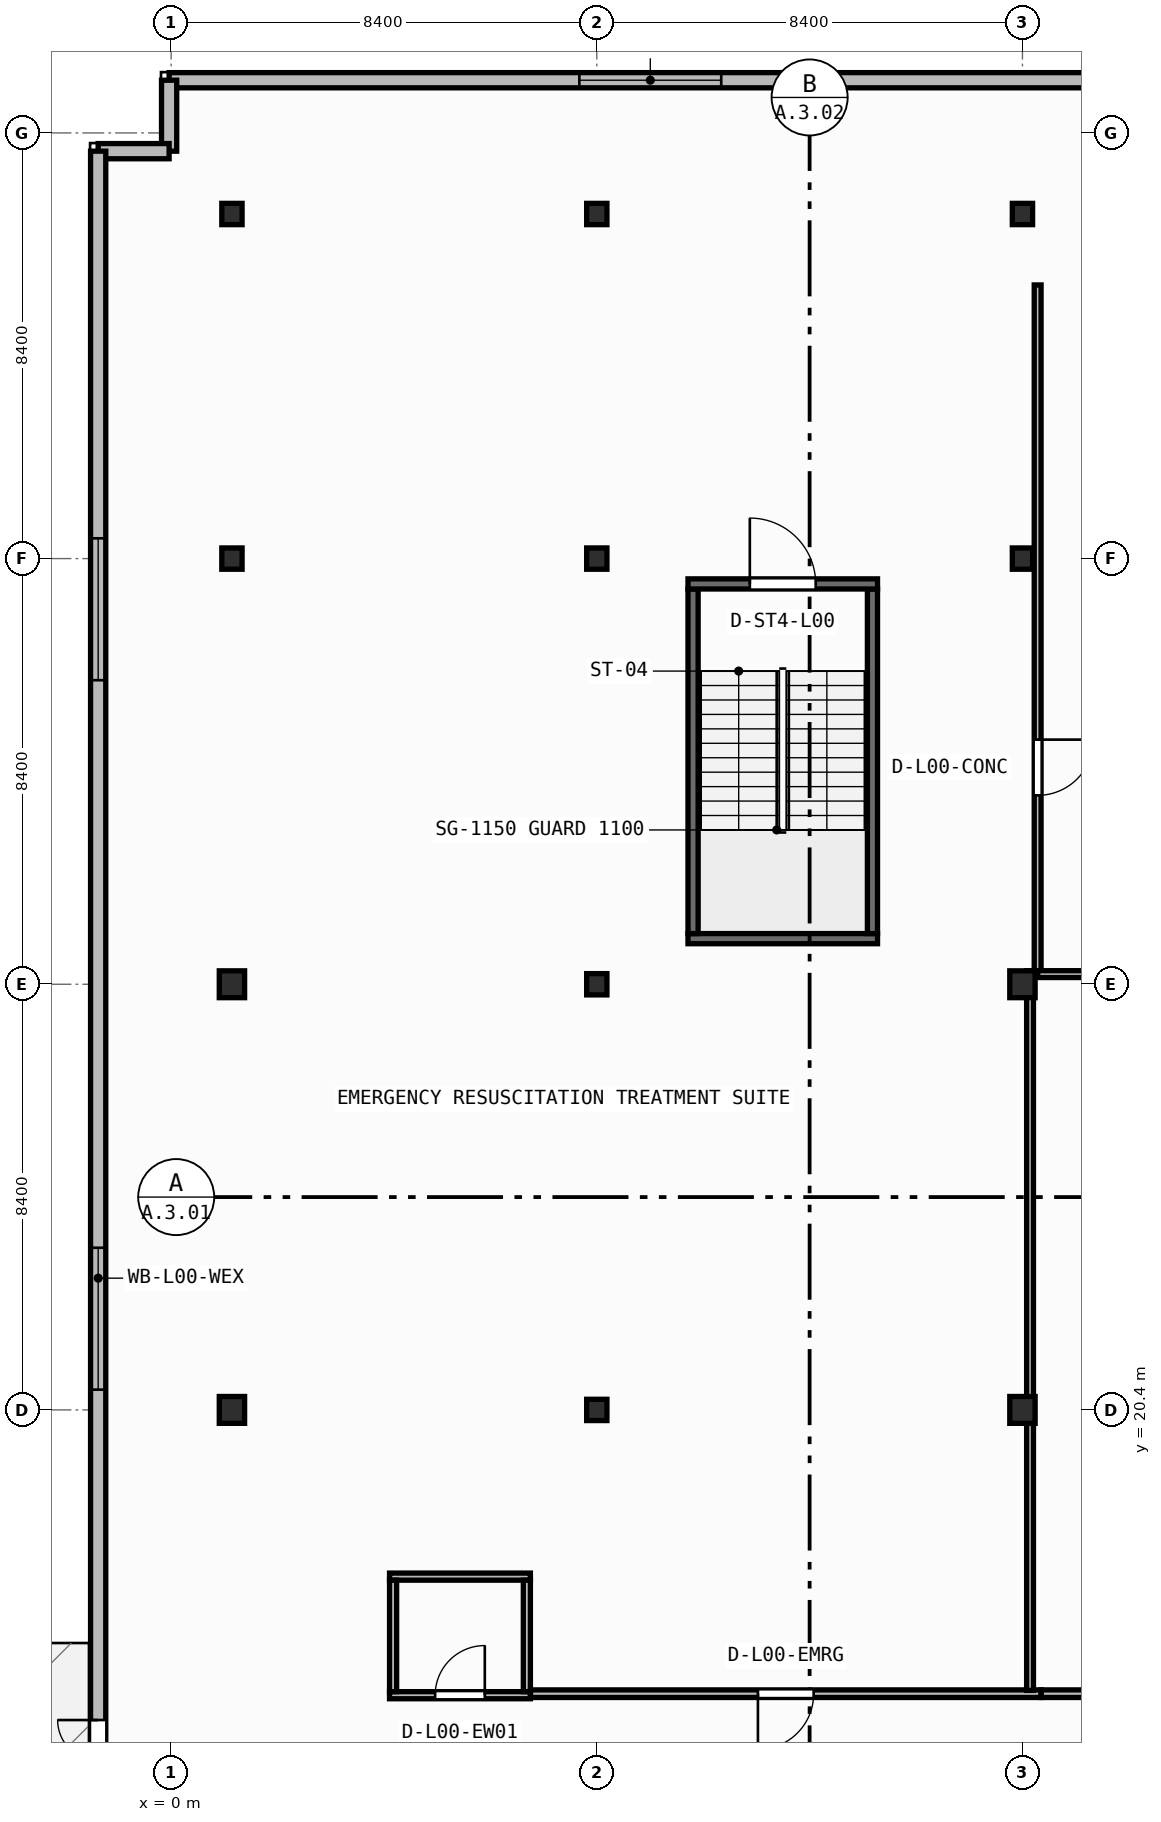
"""IFC4 building model, lengths in metres.
Left out: names, types, materials, properties, quantities, classifications, styles, units other than length and angle.
Written with IfcOpenShell. Run it as: python <this file> out.ifc"""

import sys

from ifc_helpers import new_model, si_unit, direction, frame, frame_2d, origin, origin_2d, place, context, subcontext, project, spatial, rectangle, i_section, extrude, element, fill, save


model = new_model("IFC4")
c1 = context("Model", 3, precision=1e-05, world=origin(), true_north=direction((0.0, 1.0)))
c2 = subcontext(c1, "Body", "Model", "MODEL_VIEW")
j1 = project(units=[si_unit("LENGTHUNIT", "METRE"), si_unit("PLANEANGLEUNIT", "RADIAN")], contexts=[c1])
p1 = place(None, origin())
s1 = spatial("IfcSite", under=j1, at=p1, CompositionType="ELEMENT")
p2 = place(p1, origin())
s2 = spatial("IfcBuilding", under=s1, at=p2, CompositionType="ELEMENT")
p3 = place(p2, origin())
s3 = spatial("IfcBuildingStorey", under=s2, at=p3, CompositionType="ELEMENT", Elevation=0.0)
p4 = place(p3, frame((1.2, 20.4, 0.0), z_axis=(0.0, 0.0, 1.0), x_axis=(1.0, 0.0, 0.0)))
e1 = element("IfcColumn", 1, at=p4, inside=s3, PredefinedType="COLUMN", context=c2, shape_type="SweptSolid", body=[
    extrude(i_section(OverallWidth=0.5, OverallDepth=0.53, WebThickness=0.028, FlangeThickness=0.045, at=origin_2d()), origin(), (0.0, 0.0, 1.0), 4.5),
])
p5 = place(p3, frame((8.4, 20.4, 0.0), z_axis=(0.0, 0.0, 1.0), x_axis=(1.0, 0.0, 0.0)))
e2 = element("IfcColumn", 2, at=p5, inside=s3, PredefinedType="COLUMN", context=c2, shape_type="SweptSolid", body=[
    extrude(i_section(OverallWidth=0.4, OverallDepth=0.42, WebThickness=0.025, FlangeThickness=0.04, at=origin_2d()), origin(), (0.0, 0.0, 1.0), 4.5),
])
for number, where, z_axis, x_axis in (
    (3, (16.8, 20.4, 0.0), (0.0, 0.0, 1.0), (1.0, 0.0, 0.0)),
    (4, (1.2, 28.8, 0.0), (0.0, 0.0, 1.0), (1.0, 0.0, 0.0)),
):
    element("IfcColumn", number, at=place(p3, frame(where, z_axis=z_axis, x_axis=x_axis)), inside=s3, PredefinedType="COLUMN", context=c2, shape_type="SweptSolid", body=[
        extrude(i_section(OverallWidth=0.5, OverallDepth=0.53, WebThickness=0.028, FlangeThickness=0.045, at=origin_2d()), origin(), (0.0, 0.0, 1.0), 4.5),
    ])
p6 = place(p3, frame((8.4, 28.8, 0.0), z_axis=(0.0, 0.0, 1.0), x_axis=(1.0, 0.0, 0.0)))
e5 = element("IfcColumn", 5, at=p6, inside=s3, PredefinedType="COLUMN", context=c2, shape_type="SweptSolid", body=[
    extrude(i_section(OverallWidth=0.4, OverallDepth=0.42, WebThickness=0.025, FlangeThickness=0.04, at=origin_2d()), origin(), (0.0, 0.0, 1.0), 4.5),
])
p7 = place(p3, frame((16.8, 28.8, 0.0), z_axis=(0.0, 0.0, 1.0), x_axis=(1.0, 0.0, 0.0)))
e6 = element("IfcColumn", 6, at=p7, inside=s3, PredefinedType="COLUMN", context=c2, shape_type="SweptSolid", body=[
    extrude(i_section(OverallWidth=0.5, OverallDepth=0.53, WebThickness=0.028, FlangeThickness=0.045, at=origin_2d()), origin(), (0.0, 0.0, 1.0), 4.5),
])
for number, where, z_axis, x_axis in (
    (7, (1.2, 37.2, 0.0), (0.0, 0.0, 1.0), (1.0, 0.0, 0.0)),
    (8, (8.4, 37.2, 0.0), (0.0, 0.0, 1.0), (1.0, 0.0, 0.0)),
    (9, (16.8, 37.2, 0.0), (0.0, 0.0, 1.0), (1.0, 0.0, 0.0)),
    (10, (1.2, 44.0, 0.0), (0.0, 0.0, 1.0), (1.0, 0.0, 0.0)),
    (11, (8.4, 44.0, 0.0), (0.0, 0.0, 1.0), (1.0, 0.0, 0.0)),
    (12, (16.8, 44.0, 0.0), (0.0, 0.0, 1.0), (1.0, 0.0, 0.0)),
):
    element("IfcColumn", number, at=place(p3, frame(where, z_axis=z_axis, x_axis=x_axis)), inside=s3, PredefinedType="COLUMN", context=c2, shape_type="SweptSolid", body=[
        extrude(i_section(OverallWidth=0.4, OverallDepth=0.42, WebThickness=0.025, FlangeThickness=0.04, at=origin_2d()), origin(), (0.0, 0.0, 1.0), 4.5),
    ])
p8 = place(p3, frame((18.952, 46.64, 0.0), z_axis=(0.0, 0.0, 1.0), x_axis=(-1.0, 0.0, 0.0)))
e13 = element("IfcWall", 13, at=p8, inside=s3, PredefinedType="STANDARD", context=c2, shape_type="SweptSolid", body=[
    extrude(rectangle(XDim=18.992, YDim=0.3, at=frame_2d((9.496, 0.0))), origin(), (0.0, 0.0, 1.0), 4.25),
])
p9 = place(p8, frame((8.096, 0.0, 0.85)))
e14 = element("IfcOpeningElement", 14, at=p9, cuts=e13, PredefinedType="OPENING", context=c2, shape_type="SweptSolid", body=[
    extrude(rectangle(XDim=2.8, YDim=2.1, at=frame_2d((1.4, 1.05))), frame((0.0, 0.16, 0.0), z_axis=(0.0, -1.0, 0.0), x_axis=(1.0, 0.0, 0.0)), (0.0, 0.0, 1.0), 0.32),
])
for number, where, z_axis, x_axis in (
    (15, (-0.04, 46.64, 0.0), (0.0, 0.0, 1.0), (0.0, -1.0, 0.0)),
    (16, (-0.04, 45.24, 0.0), (0.0, 0.0, 1.0), (-1.0, 0.0, 0.0)),
):
    element("IfcWall", number, at=place(p3, frame(where, z_axis=z_axis, x_axis=x_axis)), inside=s3, PredefinedType="STANDARD", context=c2, shape_type="SweptSolid", body=[
        extrude(rectangle(XDim=1.4, YDim=0.3, at=frame_2d((0.7, 0.0))), origin(), (0.0, 0.0, 1.0), 4.25),
    ])
p10 = place(p3, frame((-1.44, 0.76, 0.0), z_axis=(0.0, 0.0, 1.0), x_axis=(0.0, 1.0, 0.0)))
e17 = element("IfcWall", 17, at=p10, inside=s3, PredefinedType="STANDARD", context=c2, shape_type="SweptSolid", body=[
    extrude(rectangle(XDim=44.48, YDim=0.3, at=frame_2d((22.24, 0.0))), origin(), (0.0, 0.0, 1.0), 4.25),
])
p11 = place(p10, frame((11.92, 0.0, 0.0)))
e18 = element("IfcOpeningElement", 18, at=p11, cuts=e17, PredefinedType="OPENING", context=c2, shape_type="SweptSolid", body=[
    extrude(rectangle(XDim=1.6, YDim=2.2, at=frame_2d((0.8, 1.1))), frame((0.0, 0.16, 0.0), z_axis=(0.0, -1.0, 0.0), x_axis=(1.0, 0.0, 0.0)), (0.0, 0.0, 1.0), 0.32),
])
p12 = place(p10, frame((20.04, 0.0, 0.85)))
e19 = element("IfcOpeningElement", 19, at=p12, cuts=e17, PredefinedType="OPENING", context=c2, shape_type="SweptSolid", body=[
    extrude(rectangle(XDim=2.8, YDim=2.1, at=frame_2d((1.4, 1.05))), frame((0.0, 0.16, 0.0), z_axis=(0.0, -1.0, 0.0), x_axis=(1.0, 0.0, 0.0)), (0.0, 0.0, 1.0), 0.32),
])
p13 = place(p10, frame((34.04, 0.0, 0.85)))
e20 = element("IfcOpeningElement", 20, at=p13, cuts=e17, PredefinedType="OPENING", context=c2, shape_type="SweptSolid", body=[
    extrude(rectangle(XDim=2.8, YDim=2.1, at=frame_2d((1.4, 1.05))), frame((0.0, 0.16, 0.0), z_axis=(0.0, -1.0, 0.0), x_axis=(1.0, 0.0, 0.0)), (0.0, 0.0, 1.0), 0.32),
])
p14 = place(p3, frame((10.2, 29.7, 0.0), z_axis=(0.0, 0.0, 1.0), x_axis=(1.0, 0.0, 0.0)))
e21 = element("IfcWall", 21, at=p14, inside=s3, PredefinedType="SHEAR", context=c2, shape_type="SweptSolid", body=[
    extrude(rectangle(XDim=3.74, YDim=0.2, at=frame_2d((1.87, 0.0))), origin(), (0.0, 0.0, 1.0), 4.25),
])
for number, where, z_axis, x_axis in (
    (22, (10.3, 29.8, 0.0), (0.0, 0.0, 1.0), (0.0, 1.0, 0.0)),
    (23, (13.84, 29.8, 0.0), (0.0, 0.0, 1.0), (0.0, 1.0, 0.0)),
):
    element("IfcWall", number, at=place(p3, frame(where, z_axis=z_axis, x_axis=x_axis)), inside=s3, PredefinedType="SHEAR", context=c2, shape_type="SweptSolid", body=[
        extrude(rectangle(XDim=6.8, YDim=0.2, at=frame_2d((3.4, 0.0))), origin(), (0.0, 0.0, 1.0), 4.25),
    ])
p15 = place(p3, frame((10.2, 36.7, 0.0), z_axis=(0.0, 0.0, 1.0), x_axis=(1.0, 0.0, 0.0)))
e24 = element("IfcWall", 24, at=p15, inside=s3, PredefinedType="SHEAR", context=c2, shape_type="SweptSolid", body=[
    extrude(rectangle(XDim=3.74, YDim=0.2, at=frame_2d((1.87, 0.0))), origin(), (0.0, 0.0, 1.0), 4.25),
])
p16 = place(p15, frame((1.22, 0.0, 0.0)))
e25 = element("IfcOpeningElement", 25, at=p16, cuts=e24, PredefinedType="OPENING", context=c2, shape_type="SweptSolid", body=[
    extrude(rectangle(XDim=1.3, YDim=2.15, at=frame_2d((0.65, 1.075))), frame((0.0, 0.11, 0.0), z_axis=(0.0, -1.0, 0.0), x_axis=(1.0, 0.0, 0.0)), (0.0, 0.0, 1.0), 0.22),
])
p17 = place(p3, frame((4.31, 14.77, 0.0), z_axis=(0.0, 0.0, 1.0), x_axis=(1.0, 0.0, 0.0)))
e26 = element("IfcWall", 26, at=p17, inside=s3, PredefinedType="PARTITIONING", context=c2, shape_type="SweptSolid", body=[
    extrude(rectangle(XDim=2.78, YDim=0.14, at=frame_2d((1.39, 0.0))), origin(), (0.0, 0.0, 1.0), 4.25),
])
p18 = place(p17, frame((0.9, 0.0, 0.0)))
e27 = element("IfcOpeningElement", 27, at=p18, cuts=e26, PredefinedType="OPENING", context=c2, shape_type="SweptSolid", body=[
    extrude(rectangle(XDim=0.98, YDim=2.1, at=frame_2d((0.49, 1.05))), frame((0.0, 0.08, 0.0), z_axis=(0.0, -1.0, 0.0), x_axis=(1.0, 0.0, 0.0)), (0.0, 0.0, 1.0), 0.16),
])
p19 = place(p3, frame((4.31, 17.11, 0.0), z_axis=(0.0, 0.0, 1.0), x_axis=(1.0, 0.0, 0.0)))
e28 = element("IfcWall", 28, at=p19, inside=s3, PredefinedType="PARTITIONING", context=c2, shape_type="SweptSolid", body=[
    extrude(rectangle(XDim=2.78, YDim=0.14, at=frame_2d((1.39, 0.0))), origin(), (0.0, 0.0, 1.0), 4.25),
])
for number, where, z_axis, x_axis in (
    (29, (4.38, 14.84, 0.0), (0.0, 0.0, 1.0), (0.0, 1.0, 0.0)),
    (30, (7.02, 14.84, 0.0), (0.0, 0.0, 1.0), (0.0, 1.0, 0.0)),
):
    element("IfcWall", number, at=place(p3, frame(where, z_axis=z_axis, x_axis=x_axis)), inside=s3, PredefinedType="PARTITIONING", context=c2, shape_type="SweptSolid", body=[
        extrude(rectangle(XDim=2.2, YDim=0.14, at=frame_2d((1.1, 0.0))), origin(), (0.0, 0.0, 1.0), 4.25),
    ])
p20 = place(p3, frame((17.168, 14.8, 0.0), z_axis=(0.0, 0.0, 1.0), x_axis=(-1.0, 0.0, 0.0)))
e31 = element("IfcWall", 31, at=p20, inside=s3, PredefinedType="PARTITIONING", context=c2, shape_type="SweptSolid", body=[
    extrude(rectangle(XDim=10.076, YDim=0.15, at=frame_2d((5.038, 0.0))), origin(), (0.0, 0.0, 1.0), 4.25),
])
p21 = place(p20, frame((4.488, 0.0, 0.0)))
e32 = element("IfcOpeningElement", 32, at=p21, cuts=e31, PredefinedType="OPENING", context=c2, shape_type="SweptSolid", body=[
    extrude(rectangle(XDim=1.1, YDim=2.1, at=frame_2d((0.55, 1.05))), frame((0.0, 0.085, 0.0), z_axis=(0.0, -1.0, 0.0), x_axis=(1.0, 0.0, 0.0)), (0.0, 0.0, 1.0), 0.17),
])
p22 = place(p3, frame((33.668, 14.8, 0.0), z_axis=(0.0, 0.0, 1.0), x_axis=(-1.0, 0.0, 0.0)))
e33 = element("IfcWall", 33, at=p22, inside=s3, PredefinedType="PARTITIONING", context=c2, shape_type="SweptSolid", body=[
    extrude(rectangle(XDim=16.498, YDim=0.15, at=frame_2d((8.249, 0.0))), origin(), (0.0, 0.0, 1.0), 4.25),
])
p23 = place(p22, frame((7.699, 0.0, 0.0)))
e34 = element("IfcOpeningElement", 34, at=p23, cuts=e33, PredefinedType="OPENING", context=c2, shape_type="SweptSolid", body=[
    extrude(rectangle(XDim=1.1, YDim=2.1, at=frame_2d((0.55, 1.05))), frame((0.0, 0.085, 0.0), z_axis=(0.0, -1.0, 0.0), x_axis=(1.0, 0.0, 0.0)), (0.0, 0.0, 1.0), 0.17),
])
p24 = place(p3, frame((17.1, 42.6, 0.0), z_axis=(0.0, 0.0, 1.0), x_axis=(0.0, -1.0, 0.0)))
e35 = element("IfcWall", 35, at=p24, inside=s3, PredefinedType="PARTITIONING", context=c2, shape_type="SweptSolid", body=[
    extrude(rectangle(XDim=13.6, YDim=0.135, at=frame_2d((6.8, 0.0))), origin(), (0.0, 0.0, 1.0), 3.623),
])
p25 = place(p24, frame((8.972, 0.0, 0.0)))
e36 = element("IfcOpeningElement", 36, at=p25, cuts=e35, PredefinedType="OPENING", context=c2, shape_type="SweptSolid", body=[
    extrude(rectangle(XDim=1.1, YDim=2.1, at=frame_2d((0.55, 1.05))), frame((0.0, 0.077, 0.0), z_axis=(0.0, -1.0, 0.0), x_axis=(1.0, 0.0, 0.0)), (0.0, 0.0, 1.0), 0.155),
])
p26 = place(p3, frame((17.1, 29.0, 0.0), z_axis=(0.0, 0.0, 1.0), x_axis=(1.0, 0.0, 0.0)))
e37 = element("IfcWall", 37, at=p26, inside=s3, PredefinedType="PARTITIONING", context=c2, shape_type="SweptSolid", body=[
    extrude(rectangle(XDim=16.75, YDim=0.135, at=frame_2d((8.375, 0.0))), origin(), (0.0, 0.0, 1.0), 3.425),
])
p27 = place(p3, frame((16.95, 14.865, 0.0), z_axis=(0.0, 0.0, 1.0), x_axis=(0.0, 1.0, 0.0)))
e38 = element("IfcWall", 38, at=p27, inside=s3, PredefinedType="PARTITIONING", context=c2, shape_type="SweptSolid", body=[
    extrude(rectangle(XDim=14.202, YDim=0.135, at=frame_2d((7.101, 0.0))), origin(), (0.0, 0.0, 1.0), 3.623),
])
p28 = place(p9, origin())
e39 = element("IfcWindow", 39, at=p28, inside=s3, PartitioningType="SINGLE_PANEL", PredefinedType="WINDOW", context=c2, shape_type="SweptSolid", body=[
    extrude(rectangle(XDim=2.8, YDim=2.1, at=frame_2d((1.4, 1.05))), frame((0.0, 0.03, 0.0), z_axis=(0.0, -1.0, 0.0), x_axis=(1.0, 0.0, 0.0)), (0.0, 0.0, 1.0), 0.06),
])
fill(e14, e39)
p29 = place(p11, origin())
e40 = element("IfcDoor", 40, at=p29, inside=s3, OperationType="DOUBLE_DOOR_SINGLE_SWING", PredefinedType="DOOR", context=c2, shape_type="SweptSolid", body=[
    extrude(rectangle(XDim=1.6, YDim=2.2, at=frame_2d((0.8, 1.1))), frame((0.0, 0.025, 0.0), z_axis=(0.0, -1.0, 0.0), x_axis=(1.0, 0.0, 0.0)), (0.0, 0.0, 1.0), 0.05),
])
fill(e18, e40)
p30 = place(p12, origin())
e41 = element("IfcWindow", 41, at=p30, inside=s3, PartitioningType="SINGLE_PANEL", PredefinedType="WINDOW", context=c2, shape_type="SweptSolid", body=[
    extrude(rectangle(XDim=2.8, YDim=2.1, at=frame_2d((1.4, 1.05))), frame((0.0, 0.03, 0.0), z_axis=(0.0, -1.0, 0.0), x_axis=(1.0, 0.0, 0.0)), (0.0, 0.0, 1.0), 0.06),
])
fill(e19, e41)
p31 = place(p13, origin())
e42 = element("IfcWindow", 42, at=p31, inside=s3, PartitioningType="SINGLE_PANEL", PredefinedType="WINDOW", context=c2, shape_type="SweptSolid", body=[
    extrude(rectangle(XDim=2.8, YDim=2.1, at=frame_2d((1.4, 1.05))), frame((0.0, 0.03, 0.0), z_axis=(0.0, -1.0, 0.0), x_axis=(1.0, 0.0, 0.0)), (0.0, 0.0, 1.0), 0.06),
])
fill(e20, e42)
p32 = place(p16, origin())
e43 = element("IfcDoor", 43, at=p32, inside=s3, OperationType="SINGLE_SWING_LEFT", PredefinedType="DOOR", context=c2, shape_type="SweptSolid", body=[
    extrude(rectangle(XDim=1.3, YDim=2.15, at=frame_2d((0.65, 1.075))), frame((0.0, 0.025, 0.0), z_axis=(0.0, -1.0, 0.0), x_axis=(1.0, 0.0, 0.0)), (0.0, 0.0, 1.0), 0.05),
])
fill(e25, e43)
p33 = place(p18, origin())
e44 = element("IfcDoor", 44, at=p33, inside=s3, OperationType="SINGLE_SWING_RIGHT", PredefinedType="DOOR", context=c2, shape_type="SweptSolid", body=[
    extrude(rectangle(XDim=0.98, YDim=2.1, at=frame_2d((0.49, 1.05))), frame((0.0, 0.025, 0.0), z_axis=(0.0, -1.0, 0.0), x_axis=(1.0, 0.0, 0.0)), (0.0, 0.0, 1.0), 0.05),
])
fill(e27, e44)
p34 = place(p21, origin())
e45 = element("IfcDoor", 45, at=p34, inside=s3, OperationType="SINGLE_SWING_RIGHT", PredefinedType="DOOR", context=c2, shape_type="SweptSolid", body=[
    extrude(rectangle(XDim=1.1, YDim=2.1, at=frame_2d((0.55, 1.05))), frame((0.0, 0.025, 0.0), z_axis=(0.0, -1.0, 0.0), x_axis=(1.0, 0.0, 0.0)), (0.0, 0.0, 1.0), 0.05),
])
fill(e32, e45)
p35 = place(p25, origin())
e46 = element("IfcDoor", 46, at=p35, inside=s3, OperationType="SINGLE_SWING_LEFT", PredefinedType="DOOR", context=c2, shape_type="SweptSolid", body=[
    extrude(rectangle(XDim=1.1, YDim=2.1, at=frame_2d((0.55, 1.05))), frame((0.0, 0.025, 0.0), z_axis=(0.0, -1.0, 0.0), x_axis=(1.0, 0.0, 0.0)), (0.0, 0.0, 1.0), 0.05),
])
fill(e36, e46)
save(model, sys.argv[1])
